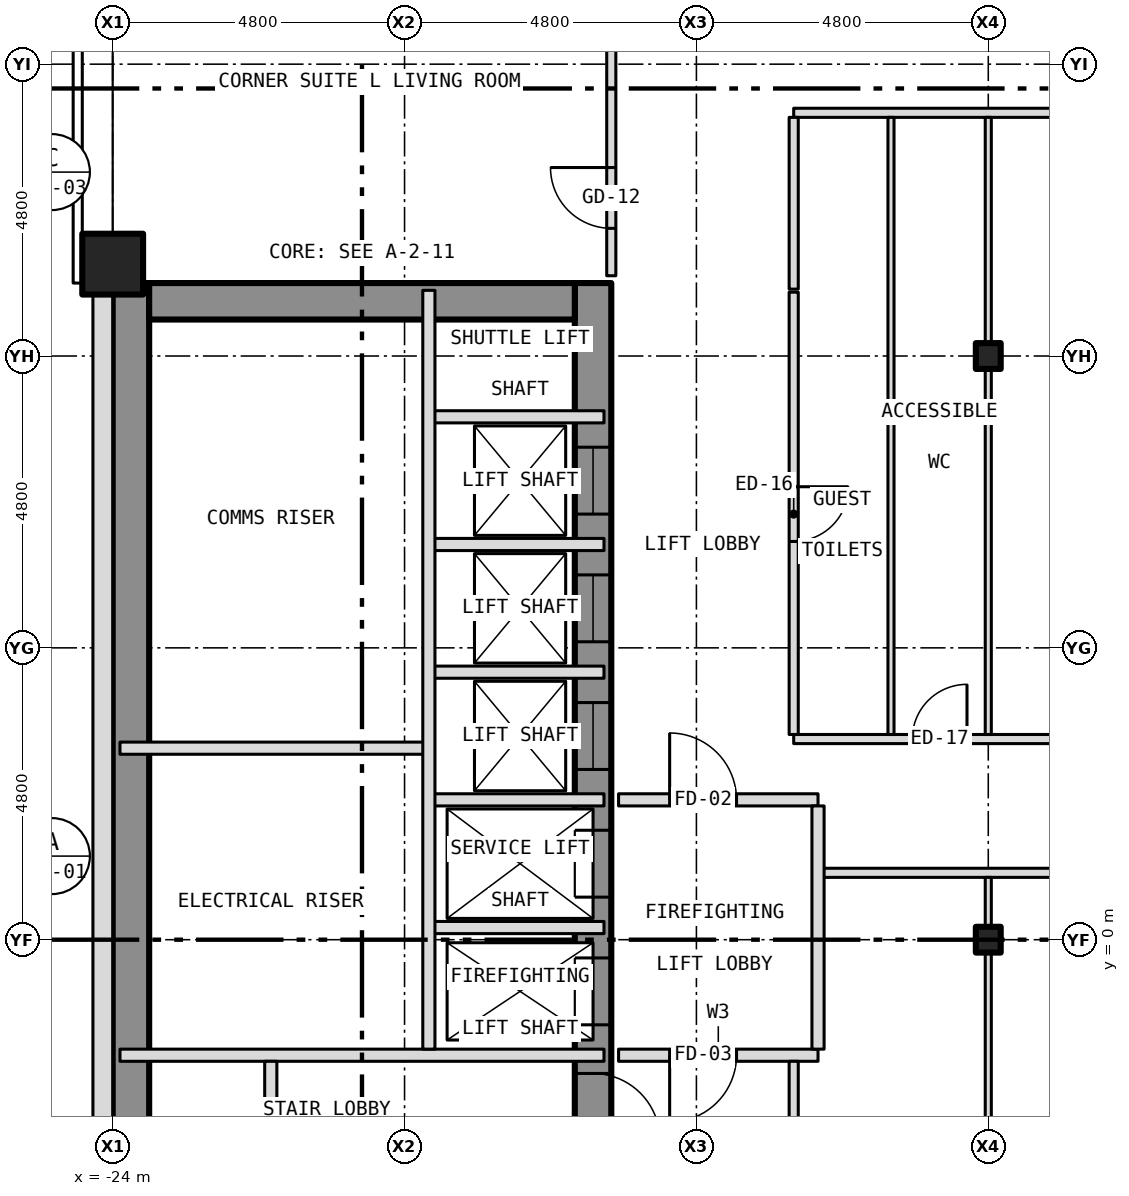
"""IFC4 building model, lengths in metres.
Left out: names, types, materials, properties, quantities, classifications, styles, units other than length and angle.
Written with IfcOpenShell. Run it as: python <this file> out.ifc"""

import sys

from ifc_helpers import new_model, si_unit, direction, frame, frame_2d, origin, origin_2d, place, context, subcontext, project, spatial, rectangle, hollow_rectangle, i_section, extrude, element, fill, save


model = new_model("IFC4")
c1 = context("Model", 3, precision=1e-05, world=origin(), true_north=direction((0.0, 1.0)))
c2 = subcontext(c1, "Body", "Model", "MODEL_VIEW")
j1 = project(units=[si_unit("LENGTHUNIT", "METRE"), si_unit("PLANEANGLEUNIT", "RADIAN")], contexts=[c1])
p1 = place(None, origin())
s1 = spatial("IfcSite", under=j1, at=p1, CompositionType="ELEMENT")
p2 = place(p1, origin())
s2 = spatial("IfcBuilding", under=s1, at=p2, CompositionType="ELEMENT")
p3 = place(p2, frame((0.0, 0.0, 42.5)))
s3 = spatial("IfcBuildingStorey", under=s2, at=p3, CompositionType="ELEMENT", Elevation=42.5)
p4 = place(p3, frame((-24.0, 11.111, -0.15), z_axis=(0.0, 0.0, 1.0), x_axis=(1.0, 0.0, 0.0)))
e1 = element("IfcColumn", 1, at=p4, inside=s3, PredefinedType="COLUMN", context=c2, shape_type="SweptSolid", body=[
    extrude(hollow_rectangle(XDim=1.0, YDim=1.0, WallThickness=0.06, at=origin_2d()), origin(), (0.0, 0.0, 1.0), 3.5),
])
for number, where, z_axis, x_axis in (
    (2, (-9.6, 0.0, -0.15), (0.0, 0.0, 1.0), (1.0, 0.0, 0.0)),
    (3, (-9.6, 9.6, -0.15), (0.0, 0.0, 1.0), (1.0, 0.0, 0.0)),
):
    element("IfcColumn", number, at=place(p3, frame(where, z_axis=z_axis, x_axis=x_axis)), inside=s3, PredefinedType="COLUMN", context=c2, shape_type="SweptSolid", body=[
        extrude(i_section(OverallWidth=0.409, OverallDepth=0.424, WebThickness=0.033, FlangeThickness=0.052, at=origin_2d()), origin(), (0.0, 0.0, 1.0), 3.5),
    ])
p5 = place(p3, frame((-16.1, -10.8, 0.0), z_axis=(0.0, 0.0, 1.0), x_axis=(0.0, 1.0, 0.0)))
e4 = element("IfcWall", 4, at=p5, inside=s3, PredefinedType="SHEAR", context=c2, shape_type="SweptSolid", body=[
    extrude(rectangle(XDim=21.6, YDim=0.6, at=frame_2d((10.8, 0.0))), origin(), (0.0, 0.0, 1.0), 3.25),
])
p6 = place(p5, frame((9.4, 0.0, 0.0)))
e5 = element("IfcOpeningElement", 5, at=p6, cuts=e4, PredefinedType="OPENING", context=c2, shape_type="SweptSolid", body=[
    extrude(rectangle(XDim=1.1, YDim=2.1, at=frame_2d((0.55, 1.05))), frame((0.0, 0.312, 0.0), z_axis=(0.0, -1.0, 0.0), x_axis=(1.0, 0.0, 0.0)), (0.0, 0.0, 1.0), 0.624),
])
p7 = place(p5, frame((11.5, 0.0, 0.0)))
e6 = element("IfcOpeningElement", 6, at=p7, cuts=e4, PredefinedType="OPENING", context=c2, shape_type="SweptSolid", body=[
    extrude(rectangle(XDim=1.1, YDim=2.1, at=frame_2d((0.55, 1.05))), frame((0.0, 0.312, 0.0), z_axis=(0.0, -1.0, 0.0), x_axis=(1.0, 0.0, 0.0)), (0.0, 0.0, 1.0), 0.624),
])
p8 = place(p5, frame((13.6, 0.0, 0.0)))
e7 = element("IfcOpeningElement", 7, at=p8, cuts=e4, PredefinedType="OPENING", context=c2, shape_type="SweptSolid", body=[
    extrude(rectangle(XDim=1.1, YDim=2.1, at=frame_2d((0.55, 1.05))), frame((0.0, 0.312, 0.0), z_axis=(0.0, -1.0, 0.0), x_axis=(1.0, 0.0, 0.0)), (0.0, 0.0, 1.0), 0.624),
])
p9 = place(p5, frame((15.7, 0.0, 0.0)))
e8 = element("IfcOpeningElement", 8, at=p9, cuts=e4, PredefinedType="OPENING", context=c2, shape_type="SweptSolid", body=[
    extrude(rectangle(XDim=1.1, YDim=2.1, at=frame_2d((0.55, 1.05))), frame((0.0, 0.312, 0.0), z_axis=(0.0, -1.0, 0.0), x_axis=(1.0, 0.0, 0.0)), (0.0, 0.0, 1.0), 0.624),
])
p10 = place(p5, frame((17.8, 0.0, 0.0)))
e9 = element("IfcOpeningElement", 9, at=p10, cuts=e4, PredefinedType="OPENING", context=c2, shape_type="SweptSolid", body=[
    extrude(rectangle(XDim=1.1, YDim=2.1, at=frame_2d((0.55, 1.05))), frame((0.0, 0.312, 0.0), z_axis=(0.0, -1.0, 0.0), x_axis=(1.0, 0.0, 0.0)), (0.0, 0.0, 1.0), 0.624),
])
p11 = place(p5, frame((0.758, 0.0, 0.0)))
e10 = element("IfcOpeningElement", 10, at=p11, cuts=e4, PredefinedType="OPENING", context=c2, shape_type="SweptSolid", body=[
    extrude(rectangle(XDim=1.1, YDim=2.1, at=frame_2d((0.55, 1.05))), frame((0.0, 0.312, 0.0), z_axis=(0.0, -1.0, 0.0), x_axis=(1.0, 0.0, 0.0)), (0.0, 0.0, 1.0), 0.624),
])
p12 = place(p5, frame((7.5, 0.0, 0.0)))
e11 = element("IfcOpeningElement", 11, at=p12, cuts=e4, PredefinedType="OPENING", context=c2, shape_type="SweptSolid", body=[
    extrude(rectangle(XDim=1.1, YDim=2.1, at=frame_2d((0.55, 1.05))), frame((0.0, 0.312, 0.0), z_axis=(0.0, -1.0, 0.0), x_axis=(1.0, 0.0, 0.0)), (0.0, 0.0, 1.0), 0.624),
])
p13 = place(p3, frame((-23.7, -10.8, 0.0), z_axis=(0.0, 0.0, 1.0), x_axis=(0.0, 1.0, 0.0)))
e12 = element("IfcWall", 12, at=p13, inside=s3, PredefinedType="SHEAR", context=c2, shape_type="SweptSolid", body=[
    extrude(rectangle(XDim=21.6, YDim=0.6, at=frame_2d((10.8, 0.0))), origin(), (0.0, 0.0, 1.0), 3.25),
])
p14 = place(p3, frame((-23.4, 10.5, 0.0), z_axis=(0.0, 0.0, 1.0), x_axis=(1.0, 0.0, 0.0)))
e13 = element("IfcWall", 13, at=p14, inside=s3, PredefinedType="SHEAR", context=c2, shape_type="SweptSolid", body=[
    extrude(rectangle(XDim=7.0, YDim=0.6, at=frame_2d((3.5, 0.0))), origin(), (0.0, 0.0, 1.0), 3.25),
])
p15 = place(p3, frame((-24.163, 10.8, 0.0), z_axis=(0.0, 0.0, 1.0), x_axis=(0.0, -1.0, 0.0)))
e14 = element("IfcWall", 14, at=p15, inside=s3, PredefinedType="SOLIDWALL", context=c2, shape_type="SweptSolid", body=[
    extrude(rectangle(XDim=21.6, YDim=0.325, at=frame_2d((10.8, 0.0))), origin(), (0.0, 0.0, 1.0), 3.5),
])
p16 = place(p15, frame((18.05, 0.0, 1.0)))
e15 = element("IfcOpeningElement", 15, at=p16, cuts=e14, PredefinedType="OPENING", context=c2, shape_type="SweptSolid", body=[
    extrude(rectangle(XDim=0.6, YDim=1.5, at=frame_2d((0.3, 0.75))), frame((0.0, 0.175, 0.0), z_axis=(0.0, -1.0, 0.0), x_axis=(1.0, 0.0, 0.0)), (0.0, 0.0, 1.0), 0.349),
])
p17 = place(p3, frame((-23.88, -1.9, 0.0), z_axis=(0.0, 0.0, 1.0), x_axis=(1.0, 0.0, 0.0)))
e16 = element("IfcWall", 16, at=p17, inside=s3, PredefinedType="PARTITIONING", context=c2, shape_type="SweptSolid", body=[
    extrude(rectangle(XDim=7.96, YDim=0.2, at=frame_2d((3.98, 0.0))), origin(), (0.0, 0.0, 1.0), 3.25),
])
p18 = place(p3, frame((-15.68, -1.9, 0.0), z_axis=(0.0, 0.0, 1.0), x_axis=(1.0, 0.0, 0.0)))
e17 = element("IfcWall", 17, at=p18, inside=s3, PredefinedType="PARTITIONING", context=c2, shape_type="SweptSolid", body=[
    extrude(rectangle(XDim=3.28, YDim=0.2, at=frame_2d((1.64, 0.0))), origin(), (0.0, 0.0, 1.0), 3.35),
])
p19 = place(p18, frame((0.84, 0.0, 0.0)))
e18 = element("IfcOpeningElement", 18, at=p19, cuts=e17, PredefinedType="OPENING", context=c2, shape_type="SweptSolid", body=[
    extrude(rectangle(XDim=1.1, YDim=2.1, at=frame_2d((0.55, 1.05))), frame((0.0, 0.112, 0.0), z_axis=(0.0, -1.0, 0.0), x_axis=(1.0, 0.0, 0.0)), (0.0, 0.0, 1.0), 0.224),
])
p20 = place(p3, frame((-18.8, 0.2, 0.0), z_axis=(0.0, 0.0, 1.0), x_axis=(1.0, 0.0, 0.0)))
e19 = element("IfcWall", 19, at=p20, inside=s3, PredefinedType="PARTITIONING", context=c2, shape_type="SweptSolid", body=[
    extrude(rectangle(XDim=2.88, YDim=0.2, at=frame_2d((1.44, 0.0))), origin(), (0.0, 0.0, 1.0), 3.25),
])
p21 = place(p3, frame((-12.4, 1.1, 0.0), z_axis=(0.0, 0.0, 1.0), x_axis=(1.0, 0.0, 0.0)))
e20 = element("IfcWall", 20, at=p21, inside=s3, PredefinedType="PARTITIONING", context=c2, shape_type="SweptSolid", body=[
    extrude(rectangle(XDim=24.8, YDim=0.15, at=frame_2d((12.4, 0.0))), origin(), (0.0, 0.0, 1.0), 3.35),
])
p22 = place(p3, frame((-18.8, 2.3, 0.0), z_axis=(0.0, 0.0, 1.0), x_axis=(1.0, 0.0, 0.0)))
e21 = element("IfcWall", 21, at=p22, inside=s3, PredefinedType="PARTITIONING", context=c2, shape_type="SweptSolid", body=[
    extrude(rectangle(XDim=2.88, YDim=0.2, at=frame_2d((1.44, 0.0))), origin(), (0.0, 0.0, 1.0), 3.25),
])
p23 = place(p3, frame((-15.68, 2.3, 0.0), z_axis=(0.0, 0.0, 1.0), x_axis=(1.0, 0.0, 0.0)))
e22 = element("IfcWall", 22, at=p23, inside=s3, PredefinedType="PARTITIONING", context=c2, shape_type="SweptSolid", body=[
    extrude(rectangle(XDim=3.28, YDim=0.2, at=frame_2d((1.64, 0.0))), origin(), (0.0, 0.0, 1.0), 3.35),
])
p24 = place(p23, frame((0.84, 0.0, 0.0)))
e23 = element("IfcOpeningElement", 23, at=p24, cuts=e22, PredefinedType="OPENING", context=c2, shape_type="SweptSolid", body=[
    extrude(rectangle(XDim=1.1, YDim=2.1, at=frame_2d((0.55, 1.05))), frame((0.0, 0.112, 0.0), z_axis=(0.0, -1.0, 0.0), x_axis=(1.0, 0.0, 0.0)), (0.0, 0.0, 1.0), 0.224),
])
p25 = place(p3, frame((-23.88, 3.15, 0.0), z_axis=(0.0, 0.0, 1.0), x_axis=(1.0, 0.0, 0.0)))
e24 = element("IfcWall", 24, at=p25, inside=s3, PredefinedType="PARTITIONING", context=c2, shape_type="SweptSolid", body=[
    extrude(rectangle(XDim=5.08, YDim=0.2, at=frame_2d((2.54, 0.0))), origin(), (0.0, 0.0, 1.0), 3.25),
])
p26 = place(p3, frame((-12.8, 3.3, 0.0), z_axis=(0.0, 0.0, 1.0), x_axis=(1.0, 0.0, 0.0)))
e25 = element("IfcWall", 25, at=p26, inside=s3, PredefinedType="PARTITIONING", context=c2, shape_type="SweptSolid", body=[
    extrude(rectangle(XDim=25.6, YDim=0.15, at=frame_2d((12.8, 0.0))), origin(), (0.0, 0.0, 1.0), 3.35),
])
p27 = place(p26, frame((1.95, 0.0, 0.0)))
e26 = element("IfcOpeningElement", 26, at=p27, cuts=e25, PredefinedType="OPENING", context=c2, shape_type="SweptSolid", body=[
    extrude(rectangle(XDim=0.9, YDim=2.1, at=frame_2d((0.45, 1.05))), frame((0.0, 0.087, 0.0), z_axis=(0.0, -1.0, 0.0), x_axis=(1.0, 0.0, 0.0)), (0.0, 0.0, 1.0), 0.174),
])
for number, where, z_axis, x_axis in (
    (27, (-18.8, 4.4, 0.0), (0.0, 0.0, 1.0), (1.0, 0.0, 0.0)),
    (28, (-18.8, 6.5, 0.0), (0.0, 0.0, 1.0), (1.0, 0.0, 0.0)),
    (29, (-18.8, 8.6, 0.0), (0.0, 0.0, 1.0), (1.0, 0.0, 0.0)),
):
    element("IfcWall", number, at=place(p3, frame(where, z_axis=z_axis, x_axis=x_axis)), inside=s3, PredefinedType="PARTITIONING", context=c2, shape_type="SweptSolid", body=[
        extrude(rectangle(XDim=2.88, YDim=0.2, at=frame_2d((1.44, 0.0))), origin(), (0.0, 0.0, 1.0), 3.25),
    ])
p28 = place(p3, frame((-12.8, 13.6, 0.0), z_axis=(0.0, 0.0, 1.0), x_axis=(1.0, 0.0, 0.0)))
e30 = element("IfcWall", 30, at=p28, inside=s3, PredefinedType="PARTITIONING", context=c2, shape_type="SweptSolid", body=[
    extrude(rectangle(XDim=25.6, YDim=0.15, at=frame_2d((12.8, 0.0))), origin(), (0.0, 0.0, 1.0), 3.35),
])
p29 = place(p28, frame((12.35, 0.0, 0.0)))
e31 = element("IfcOpeningElement", 31, at=p29, cuts=e30, PredefinedType="OPENING", context=c2, shape_type="SweptSolid", body=[
    extrude(rectangle(XDim=0.9, YDim=2.1, at=frame_2d((0.45, 1.05))), frame((0.0, 0.087, 0.0), z_axis=(0.0, -1.0, 0.0), x_axis=(1.0, 0.0, 0.0)), (0.0, 0.0, 1.0), 0.174),
])
p30 = place(p3, frame((-21.4, -10.68, 0.0), z_axis=(0.0, 0.0, 1.0), x_axis=(0.0, 1.0, 0.0)))
e32 = element("IfcWall", 32, at=p30, inside=s3, PredefinedType="PARTITIONING", context=c2, shape_type="SweptSolid", body=[
    extrude(rectangle(XDim=8.68, YDim=0.2, at=frame_2d((4.34, 0.0))), origin(), (0.0, 0.0, 1.0), 3.25),
])
p31 = place(p30, frame((0.899, 0.0, 0.0)))
e33 = element("IfcOpeningElement", 33, at=p31, cuts=e32, PredefinedType="OPENING", context=c2, shape_type="SweptSolid", body=[
    extrude(rectangle(XDim=0.9, YDim=2.1, at=frame_2d((0.45, 1.05))), frame((0.0, 0.112, 0.0), z_axis=(0.0, -1.0, 0.0), x_axis=(1.0, 0.0, 0.0)), (0.0, 0.0, 1.0), 0.224),
])
p32 = place(p30, frame((5.349, 0.0, 0.0)))
e34 = element("IfcOpeningElement", 34, at=p32, cuts=e32, PredefinedType="OPENING", context=c2, shape_type="SweptSolid", body=[
    extrude(rectangle(XDim=0.9, YDim=2.1, at=frame_2d((0.45, 1.05))), frame((0.0, 0.112, 0.0), z_axis=(0.0, -1.0, 0.0), x_axis=(1.0, 0.0, 0.0)), (0.0, 0.0, 1.0), 0.224),
])
p33 = place(p3, frame((-18.8, -1.8, 0.0), z_axis=(0.0, 0.0, 1.0), x_axis=(0.0, 1.0, 0.0)))
e35 = element("IfcWall", 35, at=p33, inside=s3, PredefinedType="PARTITIONING", context=c2, shape_type="SweptSolid", body=[
    extrude(rectangle(XDim=12.48, YDim=0.2, at=frame_2d((6.24, 0.0))), origin(), (0.0, 0.0, 1.0), 3.25),
])
p34 = place(p3, frame((-15.8, 10.92, 0.0), z_axis=(0.0, 0.0, 1.0), x_axis=(0.0, 1.0, 0.0)))
e36 = element("IfcWall", 36, at=p34, inside=s3, PredefinedType="PARTITIONING", context=c2, shape_type="SweptSolid", body=[
    extrude(rectangle(XDim=4.805, YDim=0.15, at=frame_2d((2.403, 0.0))), origin(), (0.0, 0.0, 1.0), 3.35),
])
p35 = place(p34, frame((0.78, 0.0, 0.0)))
e37 = element("IfcOpeningElement", 37, at=p35, cuts=e36, PredefinedType="OPENING", context=c2, shape_type="SweptSolid", body=[
    extrude(rectangle(XDim=1.0, YDim=2.1, at=frame_2d((0.5, 1.05))), frame((0.0, 0.087, 0.0), z_axis=(0.0, -1.0, 0.0), x_axis=(1.0, 0.0, 0.0)), (0.0, 0.0, 1.0), 0.174),
])
p36 = place(p3, frame((-12.8, -13.525, 0.0), z_axis=(0.0, 0.0, 1.0), x_axis=(0.0, 1.0, 0.0)))
e38 = element("IfcWall", 38, at=p36, inside=s3, PredefinedType="PARTITIONING", context=c2, shape_type="SweptSolid", body=[
    extrude(rectangle(XDim=11.525, YDim=0.15, at=frame_2d((5.762, 0.0))), origin(), (0.0, 0.0, 1.0), 3.35),
])
p37 = place(p36, frame((6.725, 0.0, 0.0)))
e39 = element("IfcOpeningElement", 39, at=p37, cuts=e38, PredefinedType="OPENING", context=c2, shape_type="SweptSolid", body=[
    extrude(rectangle(XDim=0.9, YDim=2.1, at=frame_2d((0.45, 1.05))), frame((0.0, 0.087, 0.0), z_axis=(0.0, -1.0, 0.0), x_axis=(1.0, 0.0, 0.0)), (0.0, 0.0, 1.0), 0.174),
])
p38 = place(p3, frame((-12.8, 3.375, 0.0), z_axis=(0.0, 0.0, 1.0), x_axis=(0.0, 1.0, 0.0)))
e40 = element("IfcWall", 40, at=p38, inside=s3, PredefinedType="PARTITIONING", context=c2, shape_type="SweptSolid", body=[
    extrude(rectangle(XDim=7.275, YDim=0.15, at=frame_2d((3.637, 0.0))), origin(), (0.0, 0.0, 1.0), 3.35),
])
p39 = place(p38, frame((3.175, 0.0, 0.0)))
e41 = element("IfcOpeningElement", 41, at=p39, cuts=e40, PredefinedType="OPENING", context=c2, shape_type="SweptSolid", body=[
    extrude(rectangle(XDim=0.9, YDim=2.1, at=frame_2d((0.45, 1.05))), frame((0.0, 0.087, 0.0), z_axis=(0.0, -1.0, 0.0), x_axis=(1.0, 0.0, 0.0)), (0.0, 0.0, 1.0), 0.174),
])
p40 = place(p3, frame((-12.8, 10.7, 0.0), z_axis=(0.0, 0.0, 1.0), x_axis=(0.0, 1.0, 0.0)))
e42 = element("IfcWall", 42, at=p40, inside=s3, PredefinedType="PARTITIONING", context=c2, shape_type="SweptSolid", body=[
    extrude(rectangle(XDim=2.825, YDim=0.15, at=frame_2d((1.413, 0.0))), origin(), (0.0, 0.0, 1.0), 3.35),
])
p41 = place(p3, frame((-12.4, -1.8, 0.0), z_axis=(0.0, 0.0, 1.0), x_axis=(0.0, 1.0, 0.0)))
e43 = element("IfcWall", 43, at=p41, inside=s3, PredefinedType="PARTITIONING", context=c2, shape_type="SweptSolid", body=[
    extrude(rectangle(XDim=4.0, YDim=0.2, at=frame_2d((2.0, 0.0))), origin(), (0.0, 0.0, 1.0), 3.35),
])
p42 = place(p3, frame((-11.2, 3.375, 0.0), z_axis=(0.0, 0.0, 1.0), x_axis=(0.0, 1.0, 0.0)))
e44 = element("IfcWall", 44, at=p42, inside=s3, PredefinedType="PARTITIONING", context=c2, shape_type="SweptSolid", body=[
    extrude(rectangle(XDim=10.15, YDim=0.1, at=frame_2d((5.075, 0.0))), origin(), (0.0, 0.0, 1.0), 3.35),
])
p43 = place(p3, frame((-9.6, -9.396, 0.0), z_axis=(0.0, 0.0, 1.0), x_axis=(0.0, 1.0, 0.0)))
e45 = element("IfcWall", 45, at=p43, inside=s3, PredefinedType="PARTITIONING", context=c2, shape_type="SweptSolid", body=[
    extrude(rectangle(XDim=9.192, YDim=0.1, at=frame_2d((4.596, 0.0))), origin(), (0.0, 0.0, 1.0), 2.728),
])
p44 = place(p3, frame((-9.6, -0.204, 0.0), z_axis=(0.0, 0.0, 1.0), x_axis=(0.0, 1.0, 0.0)))
e46 = element("IfcWall", 46, at=p44, inside=s3, PredefinedType="PARTITIONING", context=c2, shape_type="SweptSolid", body=[
    extrude(rectangle(XDim=0.408, YDim=0.1, at=frame_2d((0.204, 0.0))), origin(), (0.0, 0.0, 1.0), 3.35),
])
p45 = place(p3, frame((-9.6, 0.204, 0.0), z_axis=(0.0, 0.0, 1.0), x_axis=(0.0, 1.0, 0.0)))
e47 = element("IfcWall", 47, at=p45, inside=s3, PredefinedType="PARTITIONING", context=c2, shape_type="SweptSolid", body=[
    extrude(rectangle(XDim=0.821, YDim=0.1, at=frame_2d((0.41, 0.0))), origin(), (0.0, 0.0, 1.0), 2.728),
])
p46 = place(p3, frame((-9.6, 3.375, 0.0), z_axis=(0.0, 0.0, 1.0), x_axis=(0.0, 1.0, 0.0)))
e48 = element("IfcWall", 48, at=p46, inside=s3, PredefinedType="PARTITIONING", context=c2, shape_type="SweptSolid", body=[
    extrude(rectangle(XDim=6.021, YDim=0.1, at=frame_2d((3.01, 0.0))), origin(), (0.0, 0.0, 1.0), 2.728),
])
p47 = place(p3, frame((-9.6, 9.396, 0.0), z_axis=(0.0, 0.0, 1.0), x_axis=(0.0, 1.0, 0.0)))
e49 = element("IfcWall", 49, at=p47, inside=s3, PredefinedType="PARTITIONING", context=c2, shape_type="SweptSolid", body=[
    extrude(rectangle(XDim=0.408, YDim=0.1, at=frame_2d((0.204, 0.0))), origin(), (0.0, 0.0, 1.0), 3.35),
])
p48 = place(p3, frame((-9.6, 9.804, 0.0), z_axis=(0.0, 0.0, 1.0), x_axis=(0.0, 1.0, 0.0)))
e50 = element("IfcWall", 50, at=p48, inside=s3, PredefinedType="PARTITIONING", context=c2, shape_type="SweptSolid", body=[
    extrude(rectangle(XDim=3.721, YDim=0.1, at=frame_2d((1.86, 0.0))), origin(), (0.0, 0.0, 1.0), 2.728),
])
p49 = place(p6, origin())
e51 = element("IfcDoor", 51, at=p49, inside=s3, OperationType="SLIDING_TO_LEFT", PredefinedType="DOOR", context=c2, shape_type="SweptSolid", body=[
    extrude(rectangle(XDim=1.1, YDim=2.1, at=frame_2d((0.55, 1.05))), frame((0.0, 0.025, 0.0), z_axis=(0.0, -1.0, 0.0), x_axis=(1.0, 0.0, 0.0)), (0.0, 0.0, 1.0), 0.05),
])
fill(e5, e51)
p50 = place(p7, origin())
e52 = element("IfcDoor", 52, at=p50, inside=s3, OperationType="SLIDING_TO_LEFT", PredefinedType="DOOR", context=c2, shape_type="SweptSolid", body=[
    extrude(rectangle(XDim=1.1, YDim=2.1, at=frame_2d((0.55, 1.05))), frame((0.0, 0.025, 0.0), z_axis=(0.0, -1.0, 0.0), x_axis=(1.0, 0.0, 0.0)), (0.0, 0.0, 1.0), 0.05),
])
fill(e6, e52)
p51 = place(p8, origin())
e53 = element("IfcDoor", 53, at=p51, inside=s3, OperationType="SLIDING_TO_LEFT", PredefinedType="DOOR", context=c2, shape_type="SweptSolid", body=[
    extrude(rectangle(XDim=1.1, YDim=2.1, at=frame_2d((0.55, 1.05))), frame((0.0, 0.025, 0.0), z_axis=(0.0, -1.0, 0.0), x_axis=(1.0, 0.0, 0.0)), (0.0, 0.0, 1.0), 0.05),
])
fill(e7, e53)
p52 = place(p9, origin())
e54 = element("IfcDoor", 54, at=p52, inside=s3, OperationType="SLIDING_TO_LEFT", PredefinedType="DOOR", context=c2, shape_type="SweptSolid", body=[
    extrude(rectangle(XDim=1.1, YDim=2.1, at=frame_2d((0.55, 1.05))), frame((0.0, 0.025, 0.0), z_axis=(0.0, -1.0, 0.0), x_axis=(1.0, 0.0, 0.0)), (0.0, 0.0, 1.0), 0.05),
])
fill(e8, e54)
p53 = place(p10, origin())
e55 = element("IfcDoor", 55, at=p53, inside=s3, OperationType="SLIDING_TO_LEFT", PredefinedType="DOOR", context=c2, shape_type="SweptSolid", body=[
    extrude(rectangle(XDim=1.1, YDim=2.1, at=frame_2d((0.55, 1.05))), frame((0.0, 0.025, 0.0), z_axis=(0.0, -1.0, 0.0), x_axis=(1.0, 0.0, 0.0)), (0.0, 0.0, 1.0), 0.05),
])
fill(e9, e55)
p54 = place(p12, origin())
e56 = element("IfcDoor", 56, at=p54, inside=s3, OperationType="SINGLE_SWING_LEFT", PredefinedType="DOOR", context=c2, shape_type="SweptSolid", body=[
    extrude(rectangle(XDim=1.1, YDim=2.1, at=frame_2d((0.55, 1.05))), frame((0.0, 0.025, 0.0), z_axis=(0.0, -1.0, 0.0), x_axis=(1.0, 0.0, 0.0)), (0.0, 0.0, 1.0), 0.05),
])
fill(e11, e56)
p55 = place(p24, origin())
e57 = element("IfcDoor", 57, at=p55, inside=s3, OperationType="SINGLE_SWING_LEFT", PredefinedType="DOOR", context=c2, shape_type="SweptSolid", body=[
    extrude(rectangle(XDim=1.1, YDim=2.1, at=frame_2d((0.55, 1.05))), frame((0.0, 0.025, 0.0), z_axis=(0.0, -1.0, 0.0), x_axis=(1.0, 0.0, 0.0)), (0.0, 0.0, 1.0), 0.05),
])
fill(e23, e57)
p56 = place(p19, origin())
e58 = element("IfcDoor", 58, at=p56, inside=s3, OperationType="SINGLE_SWING_LEFT", PredefinedType="DOOR", context=c2, shape_type="SweptSolid", body=[
    extrude(rectangle(XDim=1.1, YDim=2.1, at=frame_2d((0.55, 1.05))), frame((0.0, 0.025, 0.0), z_axis=(0.0, -1.0, 0.0), x_axis=(1.0, 0.0, 0.0)), (0.0, 0.0, 1.0), 0.05),
])
fill(e18, e58)
p57 = place(p35, origin())
e59 = element("IfcDoor", 59, at=p57, inside=s3, OperationType="SINGLE_SWING_RIGHT", PredefinedType="DOOR", context=c2, shape_type="SweptSolid", body=[
    extrude(rectangle(XDim=1.0, YDim=2.1, at=frame_2d((0.5, 1.05))), frame((0.0, 0.025, 0.0), z_axis=(0.0, -1.0, 0.0), x_axis=(1.0, 0.0, 0.0)), (0.0, 0.0, 1.0), 0.05),
])
fill(e37, e59)
p58 = place(p39, origin())
e60 = element("IfcDoor", 60, at=p58, inside=s3, OperationType="SINGLE_SWING_RIGHT", PredefinedType="DOOR", context=c2, shape_type="SweptSolid", body=[
    extrude(rectangle(XDim=0.9, YDim=2.1, at=frame_2d((0.45, 1.05))), frame((0.0, 0.025, 0.0), z_axis=(0.0, -1.0, 0.0), x_axis=(1.0, 0.0, 0.0)), (0.0, 0.0, 1.0), 0.05),
])
fill(e41, e60)
p59 = place(p27, origin())
e61 = element("IfcDoor", 61, at=p59, inside=s3, OperationType="SINGLE_SWING_RIGHT", PredefinedType="DOOR", context=c2, shape_type="SweptSolid", body=[
    extrude(rectangle(XDim=0.9, YDim=2.1, at=frame_2d((0.45, 1.05))), frame((0.0, 0.025, 0.0), z_axis=(0.0, -1.0, 0.0), x_axis=(1.0, 0.0, 0.0)), (0.0, 0.0, 1.0), 0.05),
])
fill(e26, e61)
save(model, sys.argv[1])
